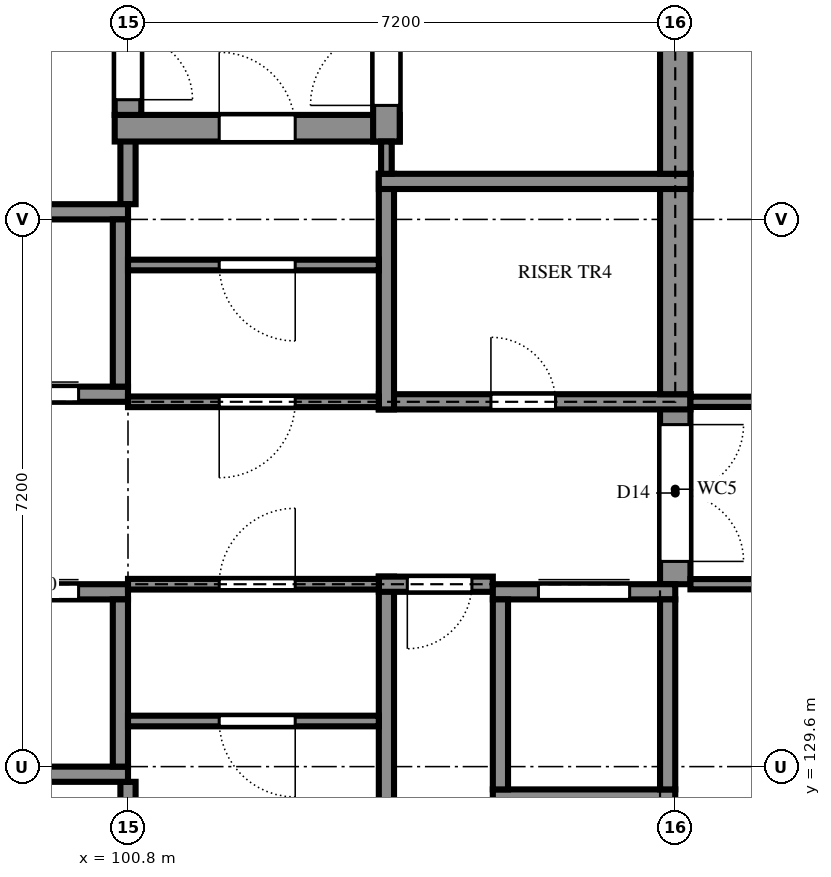
"""IFC4 building model, lengths in metres.
Left out: names, types, materials, properties, quantities, classifications, styles, units other than length and angle.
Written with IfcOpenShell. Run it as: python <this file> out.ifc"""

import sys

from ifc_helpers import new_model, si_unit, direction, frame, frame_2d, origin, place, context, subcontext, project, spatial, rectangle, extrude, element, fill, save


model = new_model("IFC4")
c1 = context("Model", 3, precision=1e-05, world=origin(), true_north=direction((0.0, 1.0)))
c2 = subcontext(c1, "Body", "Model", "MODEL_VIEW")
j1 = project(units=[si_unit("LENGTHUNIT", "METRE"), si_unit("PLANEANGLEUNIT", "RADIAN")], contexts=[c1])
p1 = place(None, origin())
s1 = spatial("IfcSite", under=j1, at=p1, CompositionType="ELEMENT")
p2 = place(p1, origin())
s2 = spatial("IfcBuilding", under=s1, at=p2, CompositionType="ELEMENT")
p3 = place(p2, frame((0.0, 0.0, 14.4)))
s3 = spatial("IfcBuildingStorey", under=s2, at=p3, CompositionType="ELEMENT", Elevation=14.4)
p4 = place(p3, frame((100.8, 128.575, 0.0), z_axis=(0.0, 0.0, 1.0), x_axis=(0.0, 1.0, 0.0)))
e1 = element("IfcWall", 1, at=p4, inside=s3, PredefinedType="SHEAR", context=c2, shape_type="SweptSolid", body=[
    extrude(rectangle(XDim=0.825, YDim=0.2, at=frame_2d((0.413, 0.0))), origin(), (0.0, 0.0, 1.0), 3.6),
])
p5 = place(p3, frame((104.2, 132.1, 0.0), z_axis=(0.0, 0.0, 1.0), x_axis=(0.0, -1.0, 0.0)))
e2 = element("IfcWall", 2, at=p5, inside=s3, PredefinedType="SHEAR", context=c2, shape_type="SweptSolid", body=[
    extrude(rectangle(XDim=3.525, YDim=0.2, at=frame_2d((1.763, 0.0))), origin(), (0.0, 0.0, 1.0), 3.6),
])
p6 = place(p3, frame((105.6, 132.0, 0.0), z_axis=(0.0, 0.0, 1.0), x_axis=(-1.0, 0.0, 0.0)))
e3 = element("IfcWall", 3, at=p6, inside=s3, PredefinedType="SHEAR", context=c2, shape_type="SweptSolid", body=[
    extrude(rectangle(XDim=1.5, YDim=0.2, at=frame_2d((0.75, 0.0))), origin(), (0.0, 0.0, 1.0), 3.6),
])
p7 = place(p6, frame((0.275, 0.0, 0.0)))
e4 = element("IfcOpeningElement", 4, at=p7, cuts=e3, PredefinedType="OPENING", context=c2, shape_type="SweptSolid", body=[
    extrude(rectangle(XDim=0.85, YDim=2.1, at=frame_2d((0.425, 1.05))), frame((0.0, 0.11, 0.0), z_axis=(0.0, -1.0, 0.0), x_axis=(1.0, 0.0, 0.0)), (0.0, 0.0, 1.0), 0.22),
])
p8 = place(p3, frame((108.0, 132.0, 0.0), z_axis=(0.0, 0.0, 1.0), x_axis=(0.0, 1.0, 0.0)))
e5 = element("IfcWall", 5, at=p8, inside=s3, PredefinedType="SHEAR", context=c2, shape_type="SweptSolid", body=[
    extrude(rectangle(XDim=2.5, YDim=0.4, at=frame_2d((1.25, 0.0))), origin(), (0.0, 0.0, 1.0), 3.6),
])
p9 = place(p8, frame((0.3, 0.0, 0.0)))
e6 = element("IfcOpeningElement", 6, at=p9, cuts=e5, PredefinedType="OPENING", context=c2, shape_type="SweptSolid", body=[
    extrude(rectangle(XDim=1.8, YDim=2.1, at=frame_2d((0.9, 1.05))), frame((0.0, 0.21, 0.0), z_axis=(0.0, -1.0, 0.0), x_axis=(1.0, 0.0, 0.0)), (0.0, 0.0, 1.0), 0.42),
])
p10 = place(p3, frame((104.1, 134.4, 0.0), z_axis=(0.0, 0.0, 1.0), x_axis=(1.0, 0.0, 0.0)))
e7 = element("IfcWall", 7, at=p10, inside=s3, PredefinedType="SHEAR", context=c2, shape_type="SweptSolid", body=[
    extrude(rectangle(XDim=4.1, YDim=0.2, at=frame_2d((2.05, 0.0))), origin(), (0.0, 0.0, 1.0), 3.6),
])
p11 = place(p10, frame((1.475, 0.0, 0.0)))
e8 = element("IfcOpeningElement", 8, at=p11, cuts=e7, PredefinedType="OPENING", context=c2, shape_type="SweptSolid", body=[
    extrude(rectangle(XDim=0.85, YDim=2.1, at=frame_2d((0.425, 1.05))), frame((0.0, 0.11, 0.0), z_axis=(0.0, -1.0, 0.0), x_axis=(1.0, 0.0, 0.0)), (0.0, 0.0, 1.0), 0.22),
])
p12 = place(p3, frame((108.0, 134.5, 0.0), z_axis=(0.0, 0.0, 1.0), x_axis=(0.0, 1.0, 0.0)))
e9 = element("IfcWall", 9, at=p12, inside=s3, PredefinedType="SHEAR", context=c2, shape_type="SweptSolid", body=[
    extrude(rectangle(XDim=2.9, YDim=0.4, at=frame_2d((1.45, 0.0))), origin(), (0.0, 0.0, 1.0), 3.6),
])
p13 = place(p3, frame((100.8, 137.0, 0.0), z_axis=(0.0, 0.0, 1.0), x_axis=(0.0, 1.0, 0.0)))
e10 = element("IfcWall", 10, at=p13, inside=s3, PredefinedType="SHEAR", context=c2, shape_type="SweptSolid", body=[
    extrude(rectangle(XDim=1.175, YDim=0.2, at=frame_2d((0.587, 0.0))), origin(), (0.0, 0.0, 1.0), 3.6),
])
p14 = place(p3, frame((104.2, 137.4, 0.0), z_axis=(0.0, 0.0, 1.0), x_axis=(0.0, -1.0, 0.0)))
e11 = element("IfcWall", 11, at=p14, inside=s3, PredefinedType="SHEAR", context=c2, shape_type="SweptSolid", body=[
    extrude(rectangle(XDim=3.1, YDim=0.2, at=frame_2d((1.55, 0.0))), origin(), (0.0, 0.0, 1.0), 3.6),
])
p15 = place(p3, frame((108.2, 137.3, 0.0), z_axis=(0.0, 0.0, 1.0), x_axis=(-1.0, 0.0, 0.0)))
e12 = element("IfcWall", 12, at=p15, inside=s3, PredefinedType="SHEAR", context=c2, shape_type="SweptSolid", body=[
    extrude(rectangle(XDim=4.1, YDim=0.2, at=frame_2d((2.05, 0.0))), origin(), (0.0, 0.0, 1.0), 3.6),
])
p16 = place(p3, frame((108.0, 137.4, 0.0), z_axis=(0.0, 0.0, 1.0), x_axis=(0.0, 1.0, 0.0)))
e13 = element("IfcWall", 13, at=p16, inside=s3, PredefinedType="SHEAR", context=c2, shape_type="SweptSolid", body=[
    extrude(rectangle(XDim=6.6, YDim=0.4, at=frame_2d((3.3, 0.0))), origin(), (0.0, 0.0, 1.0), 3.6),
])
p17 = place(p3, frame((100.625, 138.0, 0.0), z_axis=(0.0, 0.0, 1.0), x_axis=(1.0, 0.0, 0.0)))
e14 = element("IfcWall", 14, at=p17, inside=s3, PredefinedType="SHEAR", context=c2, shape_type="SweptSolid", body=[
    extrude(rectangle(XDim=3.75, YDim=0.35, at=frame_2d((1.875, 0.0))), origin(), (0.0, 0.0, 1.0), 3.6),
])
p18 = place(p17, frame((1.375, 0.0, 0.0)))
e15 = element("IfcOpeningElement", 15, at=p18, cuts=e14, PredefinedType="OPENING", context=c2, shape_type="SweptSolid", body=[
    extrude(rectangle(XDim=1.0, YDim=2.1, at=frame_2d((0.5, 1.05))), frame((0.0, 0.185, 0.0), z_axis=(0.0, -1.0, 0.0), x_axis=(1.0, 0.0, 0.0)), (0.0, 0.0, 1.0), 0.37),
])
p19 = place(p3, frame((104.2, 137.825, 0.0), z_axis=(0.0, 0.0, 1.0), x_axis=(0.0, 1.0, 0.0)))
e16 = element("IfcWall", 16, at=p19, inside=s3, PredefinedType="SHEAR", context=c2, shape_type="SweptSolid", body=[
    extrude(rectangle(XDim=3.475, YDim=0.35, at=frame_2d((1.738, 0.0))), origin(), (0.0, 0.0, 1.0), 3.6),
])
p20 = place(p19, frame((0.475, 0.0, 0.0)))
e17 = element("IfcOpeningElement", 17, at=p20, cuts=e16, PredefinedType="OPENING", context=c2, shape_type="SweptSolid", body=[
    extrude(rectangle(XDim=1.0, YDim=2.1, at=frame_2d((0.5, 1.05))), frame((0.0, 0.185, 0.0), z_axis=(0.0, -1.0, 0.0), x_axis=(1.0, 0.0, 0.0)), (0.0, 0.0, 1.0), 0.37),
])
p21 = place(p3, frame((100.8, 144.175, 0.0), z_axis=(0.0, 0.0, 1.0), x_axis=(0.0, -1.0, 0.0)))
e18 = element("IfcWall", 18, at=p21, inside=s3, PredefinedType="SHEAR", context=c2, shape_type="SweptSolid", body=[
    extrude(rectangle(XDim=6.0, YDim=0.35, at=frame_2d((3.0, 0.0))), origin(), (0.0, 0.0, 1.0), 3.6),
])
p22 = place(p21, frame((4.95, 0.0, 0.0)))
e19 = element("IfcOpeningElement", 19, at=p22, cuts=e18, PredefinedType="OPENING", context=c2, shape_type="SweptSolid", body=[
    extrude(rectangle(XDim=0.85, YDim=2.1, at=frame_2d((0.425, 1.05))), frame((0.0, 0.185, 0.0), z_axis=(0.0, -1.0, 0.0), x_axis=(1.0, 0.0, 0.0)), (0.0, 0.0, 1.0), 0.37),
])
p23 = place(p3, frame((98.4, 129.5, 0.0), z_axis=(0.0, 0.0, 1.0), x_axis=(1.0, 0.0, 0.0)))
e20 = element("IfcWall", 20, at=p23, inside=s3, PredefinedType="SHEAR", context=c2, shape_type="SweptSolid", body=[
    extrude(rectangle(XDim=2.4, YDim=0.2, at=frame_2d((1.2, 0.0))), origin(), (0.0, 0.0, 1.0), 3.6),
])
p24 = place(p3, frame((98.4, 131.9, 0.0), z_axis=(0.0, 0.0, 1.0), x_axis=(1.0, 0.0, 0.0)))
e21 = element("IfcWall", 21, at=p24, inside=s3, PredefinedType="SHEAR", context=c2, shape_type="SweptSolid", body=[
    extrude(rectangle(XDim=2.4, YDim=0.2, at=frame_2d((1.2, 0.0))), origin(), (0.0, 0.0, 1.0), 3.6),
])
p25 = place(p24, frame((0.65, 0.0, 0.0)))
e22 = element("IfcOpeningElement", 22, at=p25, cuts=e21, PredefinedType="OPENING", context=c2, shape_type="SweptSolid", body=[
    extrude(rectangle(XDim=1.1, YDim=2.1, at=frame_2d((0.55, 1.05))), frame((0.0, 0.11, 0.0), z_axis=(0.0, -1.0, 0.0), x_axis=(1.0, 0.0, 0.0)), (0.0, 0.0, 1.0), 0.22),
])
p26 = place(p3, frame((100.7, 129.6, 0.0), z_axis=(0.0, 0.0, 1.0), x_axis=(0.0, 1.0, 0.0)))
e23 = element("IfcWall", 23, at=p26, inside=s3, PredefinedType="SHEAR", context=c2, shape_type="SweptSolid", body=[
    extrude(rectangle(XDim=2.2, YDim=0.2, at=frame_2d((1.1, 0.0))), origin(), (0.0, 0.0, 1.0), 3.6),
])
p27 = place(p3, frame((98.4, 134.5, 0.0), z_axis=(0.0, 0.0, 1.0), x_axis=(1.0, 0.0, 0.0)))
e24 = element("IfcWall", 24, at=p27, inside=s3, PredefinedType="SHEAR", context=c2, shape_type="SweptSolid", body=[
    extrude(rectangle(XDim=2.4, YDim=0.2, at=frame_2d((1.2, 0.0))), origin(), (0.0, 0.0, 1.0), 3.6),
])
p28 = place(p27, frame((0.65, 0.0, 0.0)))
e25 = element("IfcOpeningElement", 25, at=p28, cuts=e24, PredefinedType="OPENING", context=c2, shape_type="SweptSolid", body=[
    extrude(rectangle(XDim=1.1, YDim=2.1, at=frame_2d((0.55, 1.05))), frame((0.0, 0.11, 0.0), z_axis=(0.0, -1.0, 0.0), x_axis=(1.0, 0.0, 0.0)), (0.0, 0.0, 1.0), 0.22),
])
p29 = place(p3, frame((98.4, 136.9, 0.0), z_axis=(0.0, 0.0, 1.0), x_axis=(1.0, 0.0, 0.0)))
e26 = element("IfcWall", 26, at=p29, inside=s3, PredefinedType="SHEAR", context=c2, shape_type="SweptSolid", body=[
    extrude(rectangle(XDim=2.4, YDim=0.2, at=frame_2d((1.2, 0.0))), origin(), (0.0, 0.0, 1.0), 3.6),
])
p30 = place(p3, frame((100.7, 134.6, 0.0), z_axis=(0.0, 0.0, 1.0), x_axis=(0.0, 1.0, 0.0)))
e27 = element("IfcWall", 27, at=p30, inside=s3, PredefinedType="SHEAR", context=c2, shape_type="SweptSolid", body=[
    extrude(rectangle(XDim=2.2, YDim=0.2, at=frame_2d((1.1, 0.0))), origin(), (0.0, 0.0, 1.0), 3.6),
])
p31 = place(p3, frame((105.6, 129.2, 0.0), z_axis=(0.0, 0.0, 1.0), x_axis=(1.0, 0.0, 0.0)))
e28 = element("IfcWall", 28, at=p31, inside=s3, PredefinedType="SHEAR", context=c2, shape_type="SweptSolid", body=[
    extrude(rectangle(XDim=2.4, YDim=0.2, at=frame_2d((1.2, 0.0))), origin(), (0.0, 0.0, 1.0), 3.6),
])
p32 = place(p3, frame((105.6, 131.9, 0.0), z_axis=(0.0, 0.0, 1.0), x_axis=(1.0, 0.0, 0.0)))
e29 = element("IfcWall", 29, at=p32, inside=s3, PredefinedType="SHEAR", context=c2, shape_type="SweptSolid", body=[
    extrude(rectangle(XDim=2.4, YDim=0.2, at=frame_2d((1.2, 0.0))), origin(), (0.0, 0.0, 1.0), 3.6),
])
p33 = place(p32, frame((0.6, 0.0, 0.0)))
e30 = element("IfcOpeningElement", 30, at=p33, cuts=e29, PredefinedType="OPENING", context=c2, shape_type="SweptSolid", body=[
    extrude(rectangle(XDim=1.2, YDim=2.1, at=frame_2d((0.6, 1.05))), frame((0.0, 0.11, 0.0), z_axis=(0.0, -1.0, 0.0), x_axis=(1.0, 0.0, 0.0)), (0.0, 0.0, 1.0), 0.22),
])
for number, where, z_axis, x_axis in (
    (31, (105.7, 129.3, 0.0), (0.0, 0.0, 1.0), (0.0, 1.0, 0.0)),
    (32, (107.9, 129.3, 0.0), (0.0, 0.0, 1.0), (0.0, 1.0, 0.0)),
):
    element("IfcWall", number, at=place(p3, frame(where, z_axis=z_axis, x_axis=x_axis)), inside=s3, PredefinedType="SHEAR", context=c2, shape_type="SweptSolid", body=[
        extrude(rectangle(XDim=2.5, YDim=0.2, at=frame_2d((1.25, 0.0))), origin(), (0.0, 0.0, 1.0), 3.6),
    ])
p34 = place(p3, frame((100.8, 130.2, 0.0), z_axis=(0.0, 0.0, 1.0), x_axis=(1.0, 0.0, 0.0)))
e33 = element("IfcWall", 33, at=p34, inside=s3, PredefinedType="PARTITIONING", context=c2, shape_type="SweptSolid", body=[
    extrude(rectangle(XDim=3.3, YDim=0.14, at=frame_2d((1.65, 0.0))), origin(), (0.0, 0.0, 1.0), 3.42),
])
p35 = place(p34, frame((1.2, 0.0, 0.0)))
e34 = element("IfcOpeningElement", 34, at=p35, cuts=e33, PredefinedType="OPENING", context=c2, shape_type="SweptSolid", body=[
    extrude(rectangle(XDim=1.0, YDim=2.1, at=frame_2d((0.5, 1.05))), frame((0.0, 0.08, 0.0), z_axis=(0.0, -1.0, 0.0), x_axis=(1.0, 0.0, 0.0)), (0.0, 0.0, 1.0), 0.16),
])
p36 = place(p3, frame((100.8, 132.0, 0.0), z_axis=(0.0, 0.0, 1.0), x_axis=(1.0, 0.0, 0.0)))
e35 = element("IfcWall", 35, at=p36, inside=s3, PredefinedType="PARTITIONING", context=c2, shape_type="SweptSolid", body=[
    extrude(rectangle(XDim=3.3, YDim=0.14, at=frame_2d((1.65, 0.0))), origin(), (0.0, 0.0, 1.0), 3.42),
])
p37 = place(p36, frame((1.2, 0.0, 0.0)))
e36 = element("IfcOpeningElement", 36, at=p37, cuts=e35, PredefinedType="OPENING", context=c2, shape_type="SweptSolid", body=[
    extrude(rectangle(XDim=1.0, YDim=2.1, at=frame_2d((0.5, 1.05))), frame((0.0, 0.08, 0.0), z_axis=(0.0, -1.0, 0.0), x_axis=(1.0, 0.0, 0.0)), (0.0, 0.0, 1.0), 0.16),
])
p38 = place(p3, frame((108.2, 132.0, 0.0), z_axis=(0.0, 0.0, 1.0), x_axis=(1.0, 0.0, 0.0)))
e37 = element("IfcWall", 37, at=p38, inside=s3, PredefinedType="PARTITIONING", context=c2, shape_type="SweptSolid", body=[
    extrude(rectangle(XDim=19.258, YDim=0.135, at=frame_2d((9.629, 0.0))), origin(), (0.0, 0.0, 1.0), 3.16),
])
p39 = place(p38, frame((2.9, 0.0, 0.0)))
e38 = element("IfcOpeningElement", 38, at=p39, cuts=e37, PredefinedType="OPENING", context=c2, shape_type="SweptSolid", body=[
    extrude(rectangle(XDim=1.0, YDim=2.4, at=frame_2d((0.5, 1.2))), frame((0.0, 0.077, 0.0), z_axis=(0.0, -1.0, 0.0), x_axis=(1.0, 0.0, 0.0)), (0.0, 0.0, 1.0), 0.155),
])
p40 = place(p38, frame((10.1, 0.0, 0.0)))
e39 = element("IfcOpeningElement", 39, at=p40, cuts=e37, PredefinedType="OPENING", context=c2, shape_type="SweptSolid", body=[
    extrude(rectangle(XDim=1.0, YDim=2.4, at=frame_2d((0.5, 1.2))), frame((0.0, 0.077, 0.0), z_axis=(0.0, -1.0, 0.0), x_axis=(1.0, 0.0, 0.0)), (0.0, 0.0, 1.0), 0.155),
])
p41 = place(p38, frame((18.1, 0.0, 0.0)))
e40 = element("IfcOpeningElement", 40, at=p41, cuts=e37, PredefinedType="OPENING", context=c2, shape_type="SweptSolid", body=[
    extrude(rectangle(XDim=1.0, YDim=2.4, at=frame_2d((0.5, 1.2))), frame((0.0, 0.077, 0.0), z_axis=(0.0, -1.0, 0.0), x_axis=(1.0, 0.0, 0.0)), (0.0, 0.0, 1.0), 0.155),
])
p42 = place(p3, frame((100.8, 134.4, 0.0), z_axis=(0.0, 0.0, 1.0), x_axis=(1.0, 0.0, 0.0)))
e41 = element("IfcWall", 41, at=p42, inside=s3, PredefinedType="PARTITIONING", context=c2, shape_type="SweptSolid", body=[
    extrude(rectangle(XDim=3.3, YDim=0.14, at=frame_2d((1.65, 0.0))), origin(), (0.0, 0.0, 1.0), 3.42),
])
p43 = place(p42, frame((1.2, 0.0, 0.0)))
e42 = element("IfcOpeningElement", 42, at=p43, cuts=e41, PredefinedType="OPENING", context=c2, shape_type="SweptSolid", body=[
    extrude(rectangle(XDim=1.0, YDim=2.1, at=frame_2d((0.5, 1.05))), frame((0.0, 0.08, 0.0), z_axis=(0.0, -1.0, 0.0), x_axis=(1.0, 0.0, 0.0)), (0.0, 0.0, 1.0), 0.16),
])
p44 = place(p3, frame((108.2, 134.4, 0.0), z_axis=(0.0, 0.0, 1.0), x_axis=(1.0, 0.0, 0.0)))
e43 = element("IfcWall", 43, at=p44, inside=s3, PredefinedType="PARTITIONING", context=c2, shape_type="SweptSolid", body=[
    extrude(rectangle(XDim=25.07, YDim=0.135, at=frame_2d((12.535, 0.0))), origin(), (0.0, 0.0, 1.0), 3.16),
])
p45 = place(p44, frame((2.9, 0.0, 0.0)))
e44 = element("IfcOpeningElement", 44, at=p45, cuts=e43, PredefinedType="OPENING", context=c2, shape_type="SweptSolid", body=[
    extrude(rectangle(XDim=1.0, YDim=2.4, at=frame_2d((0.5, 1.2))), frame((0.0, 0.077, 0.0), z_axis=(0.0, -1.0, 0.0), x_axis=(1.0, 0.0, 0.0)), (0.0, 0.0, 1.0), 0.155),
])
p46 = place(p44, frame((10.1, 0.0, 0.0)))
e45 = element("IfcOpeningElement", 45, at=p46, cuts=e43, PredefinedType="OPENING", context=c2, shape_type="SweptSolid", body=[
    extrude(rectangle(XDim=1.0, YDim=2.4, at=frame_2d((0.5, 1.2))), frame((0.0, 0.077, 0.0), z_axis=(0.0, -1.0, 0.0), x_axis=(1.0, 0.0, 0.0)), (0.0, 0.0, 1.0), 0.155),
])
p47 = place(p44, frame((17.3, 0.0, 0.0)))
e46 = element("IfcOpeningElement", 46, at=p47, cuts=e43, PredefinedType="OPENING", context=c2, shape_type="SweptSolid", body=[
    extrude(rectangle(XDim=1.0, YDim=2.4, at=frame_2d((0.5, 1.2))), frame((0.0, 0.077, 0.0), z_axis=(0.0, -1.0, 0.0), x_axis=(1.0, 0.0, 0.0)), (0.0, 0.0, 1.0), 0.155),
])
p48 = place(p44, frame((22.7, 0.0, 0.0)))
e47 = element("IfcOpeningElement", 47, at=p48, cuts=e43, PredefinedType="OPENING", context=c2, shape_type="SweptSolid", body=[
    extrude(rectangle(XDim=1.0, YDim=2.4, at=frame_2d((0.5, 1.2))), frame((0.0, 0.077, 0.0), z_axis=(0.0, -1.0, 0.0), x_axis=(1.0, 0.0, 0.0)), (0.0, 0.0, 1.0), 0.155),
])
p49 = place(p3, frame((100.8, 136.2, 0.0), z_axis=(0.0, 0.0, 1.0), x_axis=(1.0, 0.0, 0.0)))
e48 = element("IfcWall", 48, at=p49, inside=s3, PredefinedType="PARTITIONING", context=c2, shape_type="SweptSolid", body=[
    extrude(rectangle(XDim=3.3, YDim=0.14, at=frame_2d((1.65, 0.0))), origin(), (0.0, 0.0, 1.0), 3.42),
])
p50 = place(p49, frame((1.2, 0.0, 0.0)))
e49 = element("IfcOpeningElement", 49, at=p50, cuts=e48, PredefinedType="OPENING", context=c2, shape_type="SweptSolid", body=[
    extrude(rectangle(XDim=1.0, YDim=2.1, at=frame_2d((0.5, 1.05))), frame((0.0, 0.08, 0.0), z_axis=(0.0, -1.0, 0.0), x_axis=(1.0, 0.0, 0.0)), (0.0, 0.0, 1.0), 0.16),
])
p51 = place(p3, frame((104.2, 137.4, 0.0), z_axis=(0.0, 0.0, 1.0), x_axis=(0.0, 1.0, 0.0)))
e50 = element("IfcWall", 50, at=p51, inside=s3, PredefinedType="PARTITIONING", context=c2, shape_type="SweptSolid", body=[
    extrude(rectangle(XDim=0.425, YDim=0.14, at=frame_2d((0.212, 0.0))), origin(), (0.0, 0.0, 1.0), 3.42),
])
p52 = place(p25, origin())
e51 = element("IfcDoor", 51, at=p52, inside=s3, OperationType="SLIDING_TO_LEFT", PredefinedType="DOOR", context=c2, shape_type="SweptSolid", body=[
    extrude(rectangle(XDim=1.1, YDim=2.1, at=frame_2d((0.55, 1.05))), frame((0.0, 0.025, 0.0), z_axis=(0.0, -1.0, 0.0), x_axis=(1.0, 0.0, 0.0)), (0.0, 0.0, 1.0), 0.05),
])
fill(e22, e51)
p53 = place(p28, origin())
e52 = element("IfcDoor", 52, at=p53, inside=s3, OperationType="SLIDING_TO_LEFT", PredefinedType="DOOR", context=c2, shape_type="SweptSolid", body=[
    extrude(rectangle(XDim=1.1, YDim=2.1, at=frame_2d((0.55, 1.05))), frame((0.0, 0.025, 0.0), z_axis=(0.0, -1.0, 0.0), x_axis=(1.0, 0.0, 0.0)), (0.0, 0.0, 1.0), 0.05),
])
fill(e25, e52)
p54 = place(p33, origin())
e53 = element("IfcDoor", 53, at=p54, inside=s3, OperationType="SLIDING_TO_LEFT", PredefinedType="DOOR", context=c2, shape_type="SweptSolid", body=[
    extrude(rectangle(XDim=1.2, YDim=2.1, at=frame_2d((0.6, 1.05))), frame((0.0, 0.025, 0.0), z_axis=(0.0, -1.0, 0.0), x_axis=(1.0, 0.0, 0.0)), (0.0, 0.0, 1.0), 0.05),
])
fill(e30, e53)
p55 = place(p35, frame((1.0, 0.0, 0.0), z_axis=(0.0, 0.0, 1.0), x_axis=(-1.0, 0.0, 0.0)))
e54 = element("IfcDoor", 54, at=p55, inside=s3, OperationType="SINGLE_SWING_RIGHT", PredefinedType="DOOR", context=c2, shape_type="SweptSolid", body=[
    extrude(rectangle(XDim=1.0, YDim=2.1, at=frame_2d((0.5, 1.05))), frame((0.0, 0.025, 0.0), z_axis=(0.0, -1.0, 0.0), x_axis=(1.0, 0.0, 0.0)), (0.0, 0.0, 1.0), 0.05),
])
fill(e34, e54)
p56 = place(p37, origin())
e55 = element("IfcDoor", 55, at=p56, inside=s3, OperationType="SINGLE_SWING_LEFT", PredefinedType="DOOR", context=c2, shape_type="SweptSolid", body=[
    extrude(rectangle(XDim=1.0, YDim=2.1, at=frame_2d((0.5, 1.05))), frame((0.0, 0.025, 0.0), z_axis=(0.0, -1.0, 0.0), x_axis=(1.0, 0.0, 0.0)), (0.0, 0.0, 1.0), 0.05),
])
fill(e36, e55)
p57 = place(p43, frame((1.0, 0.0, 0.0), z_axis=(0.0, 0.0, 1.0), x_axis=(-1.0, 0.0, 0.0)))
e56 = element("IfcDoor", 56, at=p57, inside=s3, OperationType="SINGLE_SWING_LEFT", PredefinedType="DOOR", context=c2, shape_type="SweptSolid", body=[
    extrude(rectangle(XDim=1.0, YDim=2.1, at=frame_2d((0.5, 1.05))), frame((0.0, 0.025, 0.0), z_axis=(0.0, -1.0, 0.0), x_axis=(1.0, 0.0, 0.0)), (0.0, 0.0, 1.0), 0.05),
])
fill(e42, e56)
p58 = place(p50, frame((1.0, 0.0, 0.0), z_axis=(0.0, 0.0, 1.0), x_axis=(-1.0, 0.0, 0.0)))
e57 = element("IfcDoor", 57, at=p58, inside=s3, OperationType="SINGLE_SWING_RIGHT", PredefinedType="DOOR", context=c2, shape_type="SweptSolid", body=[
    extrude(rectangle(XDim=1.0, YDim=2.1, at=frame_2d((0.5, 1.05))), frame((0.0, 0.025, 0.0), z_axis=(0.0, -1.0, 0.0), x_axis=(1.0, 0.0, 0.0)), (0.0, 0.0, 1.0), 0.05),
])
fill(e49, e57)
p59 = place(p7, origin())
e58 = element("IfcDoor", 58, at=p59, inside=s3, OperationType="SINGLE_SWING_LEFT", PredefinedType="DOOR", context=c2, shape_type="SweptSolid", body=[
    extrude(rectangle(XDim=0.85, YDim=2.1, at=frame_2d((0.425, 1.05))), frame((0.0, 0.025, 0.0), z_axis=(0.0, -1.0, 0.0), x_axis=(1.0, 0.0, 0.0)), (0.0, 0.0, 1.0), 0.05),
])
fill(e4, e58)
p60 = place(p11, origin())
e59 = element("IfcDoor", 59, at=p60, inside=s3, OperationType="SINGLE_SWING_RIGHT", PredefinedType="DOOR", context=c2, shape_type="SweptSolid", body=[
    extrude(rectangle(XDim=0.85, YDim=2.1, at=frame_2d((0.425, 1.05))), frame((0.0, 0.025, 0.0), z_axis=(0.0, -1.0, 0.0), x_axis=(1.0, 0.0, 0.0)), (0.0, 0.0, 1.0), 0.05),
])
fill(e8, e59)
p61 = place(p18, origin())
e60 = element("IfcDoor", 60, at=p61, inside=s3, OperationType="SINGLE_SWING_RIGHT", PredefinedType="DOOR", context=c2, shape_type="SweptSolid", body=[
    extrude(rectangle(XDim=1.0, YDim=2.1, at=frame_2d((0.5, 1.05))), frame((0.0, 0.025, 0.0), z_axis=(0.0, -1.0, 0.0), x_axis=(1.0, 0.0, 0.0)), (0.0, 0.0, 1.0), 0.05),
])
fill(e15, e60)
p62 = place(p22, origin())
e61 = element("IfcDoor", 61, at=p62, inside=s3, OperationType="SINGLE_SWING_LEFT", PredefinedType="DOOR", context=c2, shape_type="SweptSolid", body=[
    extrude(rectangle(XDim=0.85, YDim=2.1, at=frame_2d((0.425, 1.05))), frame((0.0, 0.025, 0.0), z_axis=(0.0, -1.0, 0.0), x_axis=(1.0, 0.0, 0.0)), (0.0, 0.0, 1.0), 0.05),
])
fill(e19, e61)
p63 = place(p20, origin())
e62 = element("IfcDoor", 62, at=p63, inside=s3, OperationType="SINGLE_SWING_RIGHT", PredefinedType="DOOR", context=c2, shape_type="SweptSolid", body=[
    extrude(rectangle(XDim=1.0, YDim=2.1, at=frame_2d((0.5, 1.05))), frame((0.0, 0.025, 0.0), z_axis=(0.0, -1.0, 0.0), x_axis=(1.0, 0.0, 0.0)), (0.0, 0.0, 1.0), 0.05),
])
fill(e17, e62)
p64 = place(p9, frame((1.8, 0.0, 0.0), z_axis=(0.0, 0.0, 1.0), x_axis=(-1.0, 0.0, 0.0)))
e63 = element("IfcDoor", 63, at=p64, inside=s3, OperationType="DOUBLE_DOOR_SINGLE_SWING", PredefinedType="DOOR", context=c2, shape_type="SweptSolid", body=[
    extrude(rectangle(XDim=1.8, YDim=2.1, at=frame_2d((0.9, 1.05))), frame((0.0, 0.025, 0.0), z_axis=(0.0, -1.0, 0.0), x_axis=(1.0, 0.0, 0.0)), (0.0, 0.0, 1.0), 0.05),
])
fill(e6, e63)
save(model, sys.argv[1])
